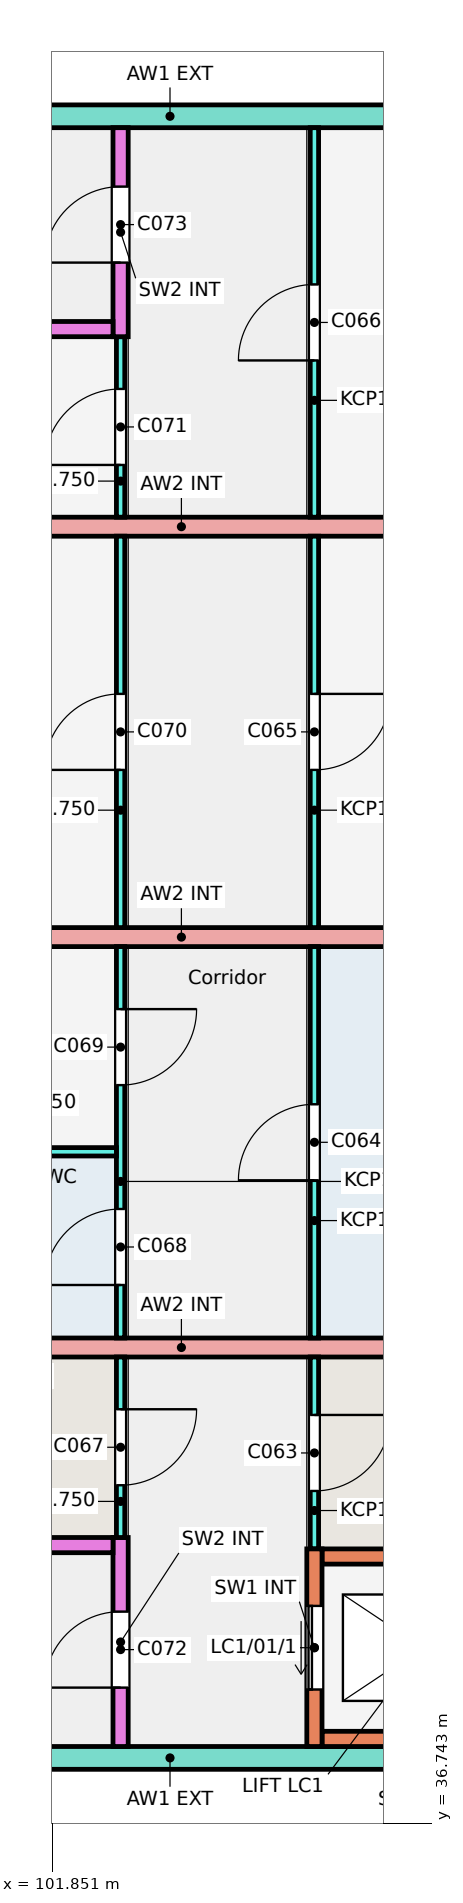
"""IFC4 building model, lengths in metres.
Left out: names, types, materials, properties, quantities, classifications, styles, units other than length and angle.
Written with IfcOpenShell. Run it as: python <this file> out.ifc"""

import sys

from ifc_helpers import new_model, si_unit, direction, frame, frame_2d, origin, place, context, subcontext, project, spatial, rectangle, extrude, element, fill, save


model = new_model("IFC4")
c1 = context("Model", 3, precision=1e-05, world=origin(), true_north=direction((0.0, 1.0)))
c2 = subcontext(c1, "Body", "Model", "MODEL_VIEW")
j1 = project(units=[si_unit("LENGTHUNIT", "METRE"), si_unit("PLANEANGLEUNIT", "RADIAN")], contexts=[c1])
p1 = place(None, origin())
s1 = spatial("IfcSite", under=j1, at=p1, CompositionType="ELEMENT")
p2 = place(p1, origin())
s2 = spatial("IfcBuilding", under=s1, at=p2, CompositionType="ELEMENT")
p3 = place(p2, frame((0.0, 0.0, 3.0)))
s3 = spatial("IfcBuildingStorey", under=s2, at=p3, CompositionType="ELEMENT", Elevation=3.0)
p4 = place(p3, frame((114.4, 37.6, 0.0), z_axis=(0.0, 0.0, 1.0), x_axis=(-1.0, 0.0, 0.0)))
e1 = element("IfcWall", 1, at=p4, inside=s3, PredefinedType="SOLIDWALL", context=c2, shape_type="SweptSolid", body=[
    extrude(rectangle(XDim=22.0, YDim=0.3, at=frame_2d((11.0, 0.0))), origin(), (0.0, 0.0, 1.0), 3.0),
])
p5 = place(p4, frame((14.298, 0.0, 0.9)))
e2 = element("IfcOpeningElement", 2, at=p5, cuts=e1, PredefinedType="OPENING", context=c2, shape_type="SweptSolid", body=[
    extrude(rectangle(XDim=1.2, YDim=1.5, at=frame_2d((0.6, 0.75))), frame((0.0, 0.16, 0.0), z_axis=(0.0, -1.0, 0.0), x_axis=(1.0, 0.0, 0.0)), (0.0, 0.0, 1.0), 0.32),
])
p6 = place(p3, frame((114.4, 59.2, 0.0), z_axis=(0.0, 0.0, 1.0), x_axis=(-1.0, 0.0, 0.0)))
e3 = element("IfcWall", 3, at=p6, inside=s3, PredefinedType="SOLIDWALL", context=c2, shape_type="SweptSolid", body=[
    extrude(rectangle(XDim=22.0, YDim=0.3, at=frame_2d((11.0, 0.0))), origin(), (0.0, 0.0, 1.0), 3.0),
])
p7 = place(p6, frame((14.298, 0.0, 0.9)))
e4 = element("IfcOpeningElement", 4, at=p7, cuts=e3, PredefinedType="OPENING", context=c2, shape_type="SweptSolid", body=[
    extrude(rectangle(XDim=1.2, YDim=1.5, at=frame_2d((0.6, 0.75))), frame((0.0, 0.16, 0.0), z_axis=(0.0, -1.0, 0.0), x_axis=(1.0, 0.0, 0.0)), (0.0, 0.0, 1.0), 0.32),
])
for number, where, z_axis, x_axis in (
    (5, (114.4, 43.0, 0.0), (0.0, 0.0, 1.0), (-1.0, 0.0, 0.0)),
    (6, (114.4, 48.4, 0.0), (0.0, 0.0, 1.0), (-1.0, 0.0, 0.0)),
    (7, (114.4, 53.8, 0.0), (0.0, 0.0, 1.0), (-1.0, 0.0, 0.0)),
):
    element("IfcWall", number, at=place(p3, frame(where, z_axis=z_axis, x_axis=x_axis)), inside=s3, PredefinedType="SOLIDWALL", context=c2, shape_type="SweptSolid", body=[
        extrude(rectangle(XDim=21.7, YDim=0.25, at=frame_2d((10.85, 0.0))), origin(), (0.0, 0.0, 1.0), 3.0),
    ])
p8 = place(p3, frame((105.3, 40.35, 0.0), z_axis=(0.0, 0.0, 1.0), x_axis=(0.0, 1.0, 0.0)))
e8 = element("IfcWall", 8, at=p8, inside=s3, PredefinedType="PARTITIONING", context=c2, shape_type="SweptSolid", body=[
    extrude(rectangle(XDim=2.525, YDim=0.11, at=frame_2d((1.262, 0.0))), origin(), (0.0, 0.0, 1.0), 2.75),
])
p9 = place(p8, frame((0.762, 0.0, 0.0)))
e9 = element("IfcOpeningElement", 9, at=p9, cuts=e8, PredefinedType="OPENING", context=c2, shape_type="SweptSolid", body=[
    extrude(rectangle(XDim=1.0, YDim=2.1, at=frame_2d((0.5, 1.05))), frame((0.0, 0.065, 0.0), z_axis=(0.0, -1.0, 0.0), x_axis=(1.0, 0.0, 0.0)), (0.0, 0.0, 1.0), 0.13),
])
p10 = place(p3, frame((105.3, 43.125, 0.0), z_axis=(0.0, 0.0, 1.0), x_axis=(0.0, 1.0, 0.0)))
e10 = element("IfcWall", 10, at=p10, inside=s3, PredefinedType="PARTITIONING", context=c2, shape_type="SweptSolid", body=[
    extrude(rectangle(XDim=5.15, YDim=0.11, at=frame_2d((2.575, 0.0))), origin(), (0.0, 0.0, 1.0), 2.75),
])
p11 = place(p10, frame((2.075, 0.0, 0.0)))
e11 = element("IfcOpeningElement", 11, at=p11, cuts=e10, PredefinedType="OPENING", context=c2, shape_type="SweptSolid", body=[
    extrude(rectangle(XDim=1.0, YDim=2.1, at=frame_2d((0.5, 1.05))), frame((0.0, 0.065, 0.0), z_axis=(0.0, -1.0, 0.0), x_axis=(1.0, 0.0, 0.0)), (0.0, 0.0, 1.0), 0.13),
])
p12 = place(p3, frame((105.3, 48.525, 0.0), z_axis=(0.0, 0.0, 1.0), x_axis=(0.0, 1.0, 0.0)))
e12 = element("IfcWall", 12, at=p12, inside=s3, PredefinedType="PARTITIONING", context=c2, shape_type="SweptSolid", body=[
    extrude(rectangle(XDim=5.15, YDim=0.11, at=frame_2d((2.575, 0.0))), origin(), (0.0, 0.0, 1.0), 2.75),
])
p13 = place(p12, frame((2.075, 0.0, 0.0)))
e13 = element("IfcOpeningElement", 13, at=p13, cuts=e12, PredefinedType="OPENING", context=c2, shape_type="SweptSolid", body=[
    extrude(rectangle(XDim=1.0, YDim=2.1, at=frame_2d((0.5, 1.05))), frame((0.0, 0.065, 0.0), z_axis=(0.0, -1.0, 0.0), x_axis=(1.0, 0.0, 0.0)), (0.0, 0.0, 1.0), 0.13),
])
p14 = place(p3, frame((105.3, 53.925, 0.0), z_axis=(0.0, 0.0, 1.0), x_axis=(0.0, 1.0, 0.0)))
e14 = element("IfcWall", 14, at=p14, inside=s3, PredefinedType="PARTITIONING", context=c2, shape_type="SweptSolid", body=[
    extrude(rectangle(XDim=5.125, YDim=0.11, at=frame_2d((2.562, 0.0))), origin(), (0.0, 0.0, 1.0), 2.75),
])
p15 = place(p14, frame((2.062, 0.0, 0.0)))
e15 = element("IfcOpeningElement", 15, at=p15, cuts=e14, PredefinedType="OPENING", context=c2, shape_type="SweptSolid", body=[
    extrude(rectangle(XDim=1.0, YDim=2.1, at=frame_2d((0.5, 1.05))), frame((0.0, 0.065, 0.0), z_axis=(0.0, -1.0, 0.0), x_axis=(1.0, 0.0, 0.0)), (0.0, 0.0, 1.0), 0.13),
])
p16 = place(p3, frame((102.75, 37.75, 0.0), z_axis=(0.0, 0.0, 1.0), x_axis=(0.0, 1.0, 0.0)))
e16 = element("IfcWall", 16, at=p16, inside=s3, PredefinedType="SOLIDWALL", context=c2, shape_type="SweptSolid", body=[
    extrude(rectangle(XDim=2.75, YDim=0.2, at=frame_2d((1.375, 0.0))), origin(), (0.0, 0.0, 1.0), 2.75),
])
p17 = place(p16, frame((0.775, 0.0, 0.0)))
e17 = element("IfcOpeningElement", 17, at=p17, cuts=e16, PredefinedType="OPENING", context=c2, shape_type="SweptSolid", body=[
    extrude(rectangle(XDim=1.0, YDim=2.1, at=frame_2d((0.5, 1.05))), frame((0.0, 0.11, 0.0), z_axis=(0.0, -1.0, 0.0), x_axis=(1.0, 0.0, 0.0)), (0.0, 0.0, 1.0), 0.22),
])
p18 = place(p3, frame((102.75, 40.5, 0.0), z_axis=(0.0, 0.0, 1.0), x_axis=(0.0, 1.0, 0.0)))
e18 = element("IfcWall", 18, at=p18, inside=s3, PredefinedType="PARTITIONING", context=c2, shape_type="SweptSolid", body=[
    extrude(rectangle(XDim=2.375, YDim=0.11, at=frame_2d((1.188, 0.0))), origin(), (0.0, 0.0, 1.0), 2.75),
])
p19 = place(p18, frame((0.688, 0.0, 0.0)))
e19 = element("IfcOpeningElement", 19, at=p19, cuts=e18, PredefinedType="OPENING", context=c2, shape_type="SweptSolid", body=[
    extrude(rectangle(XDim=1.0, YDim=2.1, at=frame_2d((0.5, 1.05))), frame((0.0, 0.065, 0.0), z_axis=(0.0, -1.0, 0.0), x_axis=(1.0, 0.0, 0.0)), (0.0, 0.0, 1.0), 0.13),
])
p20 = place(p3, frame((102.75, 43.125, 0.0), z_axis=(0.0, 0.0, 1.0), x_axis=(0.0, 1.0, 0.0)))
e20 = element("IfcWall", 20, at=p20, inside=s3, PredefinedType="PARTITIONING", context=c2, shape_type="SweptSolid", body=[
    extrude(rectangle(XDim=5.15, YDim=0.11, at=frame_2d((2.575, 0.0))), origin(), (0.0, 0.0, 1.0), 2.75),
])
p21 = place(p20, frame((0.698, 0.0, 0.0)))
e21 = element("IfcOpeningElement", 21, at=p21, cuts=e20, PredefinedType="OPENING", context=c2, shape_type="SweptSolid", body=[
    extrude(rectangle(XDim=1.0, YDim=2.1, at=frame_2d((0.5, 1.05))), frame((0.0, 0.065, 0.0), z_axis=(0.0, -1.0, 0.0), x_axis=(1.0, 0.0, 0.0)), (0.0, 0.0, 1.0), 0.13),
])
p22 = place(p20, frame((3.327, 0.0, 0.0)))
e22 = element("IfcOpeningElement", 22, at=p22, cuts=e20, PredefinedType="OPENING", context=c2, shape_type="SweptSolid", body=[
    extrude(rectangle(XDim=1.0, YDim=2.1, at=frame_2d((0.5, 1.05))), frame((0.0, 0.065, 0.0), z_axis=(0.0, -1.0, 0.0), x_axis=(1.0, 0.0, 0.0)), (0.0, 0.0, 1.0), 0.13),
])
p23 = place(p3, frame((102.75, 48.525, 0.0), z_axis=(0.0, 0.0, 1.0), x_axis=(0.0, 1.0, 0.0)))
e23 = element("IfcWall", 23, at=p23, inside=s3, PredefinedType="PARTITIONING", context=c2, shape_type="SweptSolid", body=[
    extrude(rectangle(XDim=5.15, YDim=0.11, at=frame_2d((2.575, 0.0))), origin(), (0.0, 0.0, 1.0), 2.75),
])
p24 = place(p23, frame((2.075, 0.0, 0.0)))
e24 = element("IfcOpeningElement", 24, at=p24, cuts=e23, PredefinedType="OPENING", context=c2, shape_type="SweptSolid", body=[
    extrude(rectangle(XDim=1.0, YDim=2.1, at=frame_2d((0.5, 1.05))), frame((0.0, 0.065, 0.0), z_axis=(0.0, -1.0, 0.0), x_axis=(1.0, 0.0, 0.0)), (0.0, 0.0, 1.0), 0.13),
])
p25 = place(p3, frame((102.75, 53.925, 0.0), z_axis=(0.0, 0.0, 1.0), x_axis=(0.0, 1.0, 0.0)))
e25 = element("IfcWall", 25, at=p25, inside=s3, PredefinedType="PARTITIONING", context=c2, shape_type="SweptSolid", body=[
    extrude(rectangle(XDim=2.375, YDim=0.11, at=frame_2d((1.188, 0.0))), origin(), (0.0, 0.0, 1.0), 2.75),
])
p26 = place(p25, frame((0.688, 0.0, 0.0)))
e26 = element("IfcOpeningElement", 26, at=p26, cuts=e25, PredefinedType="OPENING", context=c2, shape_type="SweptSolid", body=[
    extrude(rectangle(XDim=1.0, YDim=2.1, at=frame_2d((0.5, 1.05))), frame((0.0, 0.065, 0.0), z_axis=(0.0, -1.0, 0.0), x_axis=(1.0, 0.0, 0.0)), (0.0, 0.0, 1.0), 0.13),
])
p27 = place(p3, frame((102.75, 56.3, 0.0), z_axis=(0.0, 0.0, 1.0), x_axis=(0.0, 1.0, 0.0)))
e27 = element("IfcWall", 27, at=p27, inside=s3, PredefinedType="SOLIDWALL", context=c2, shape_type="SweptSolid", body=[
    extrude(rectangle(XDim=2.75, YDim=0.2, at=frame_2d((1.375, 0.0))), origin(), (0.0, 0.0, 1.0), 2.75),
])
p28 = place(p27, frame((0.975, 0.0, 0.0)))
e28 = element("IfcOpeningElement", 28, at=p28, cuts=e27, PredefinedType="OPENING", context=c2, shape_type="SweptSolid", body=[
    extrude(rectangle(XDim=1.0, YDim=2.1, at=frame_2d((0.5, 1.05))), frame((0.0, 0.11, 0.0), z_axis=(0.0, -1.0, 0.0), x_axis=(1.0, 0.0, 0.0)), (0.0, 0.0, 1.0), 0.22),
])
for number, where, z_axis, x_axis in (
    (29, (102.65, 40.4, 0.0), (0.0, 0.0, 1.0), (-1.0, 0.0, 0.0)),
    (30, (102.65, 56.4, 0.0), (0.0, 0.0, 1.0), (-1.0, 0.0, 0.0)),
):
    element("IfcWall", number, at=place(p3, frame(where, z_axis=z_axis, x_axis=x_axis)), inside=s3, PredefinedType="SOLIDWALL", context=c2, shape_type="SweptSolid", body=[
        extrude(rectangle(XDim=4.84, YDim=0.2, at=frame_2d((2.42, 0.0))), origin(), (0.0, 0.0, 1.0), 2.75),
    ])
p29 = place(p3, frame((102.695, 45.575, 0.0), z_axis=(0.0, 0.0, 1.0), x_axis=(-1.0, 0.0, 0.0)))
e31 = element("IfcWall", 31, at=p29, inside=s3, PredefinedType="PARTITIONING", context=c2, shape_type="SweptSolid", body=[
    extrude(rectangle(XDim=2.85, YDim=0.11, at=frame_2d((1.425, 0.0))), origin(), (0.0, 0.0, 1.0), 2.75),
])
for number, where, z_axis, x_axis in (
    (32, (107.95, 40.25, 0.0), (0.0, 0.0, 1.0), (-1.0, 0.0, 0.0)),
    (33, (107.95, 37.85, 0.0), (0.0, 0.0, 1.0), (-1.0, 0.0, 0.0)),
):
    element("IfcWall", number, at=place(p3, frame(where, z_axis=z_axis, x_axis=x_axis)), inside=s3, PredefinedType="SOLIDWALL", context=c2, shape_type="SweptSolid", body=[
        extrude(rectangle(XDim=2.55, YDim=0.2, at=frame_2d((1.275, 0.0))), origin(), (0.0, 0.0, 1.0), 3.0),
    ])
p30 = place(p3, frame((105.3, 37.75, 0.0), z_axis=(0.0, 0.0, 1.0), x_axis=(0.0, 1.0, 0.0)))
e34 = element("IfcWall", 34, at=p30, inside=s3, PredefinedType="SOLIDWALL", context=c2, shape_type="SweptSolid", body=[
    extrude(rectangle(XDim=2.6, YDim=0.2, at=frame_2d((1.3, 0.0))), origin(), (0.0, 0.0, 1.0), 3.0),
])
p31 = place(p30, frame((0.75, 0.0, 0.0)))
e35 = element("IfcOpeningElement", 35, at=p31, cuts=e34, PredefinedType="OPENING", context=c2, shape_type="SweptSolid", body=[
    extrude(rectangle(XDim=1.1, YDim=2.1, at=frame_2d((0.55, 1.05))), frame((0.0, 0.11, 0.0), z_axis=(0.0, -1.0, 0.0), x_axis=(1.0, 0.0, 0.0)), (0.0, 0.0, 1.0), 0.22),
])
p32 = place(p9, origin())
e36 = element("IfcDoor", 36, at=p32, inside=s3, OperationType="SINGLE_SWING_RIGHT", PredefinedType="DOOR", context=c2, shape_type="SweptSolid", body=[
    extrude(rectangle(XDim=1.0, YDim=2.1, at=frame_2d((0.5, 1.05))), frame((0.0, 0.025, 0.0), z_axis=(0.0, -1.0, 0.0), x_axis=(1.0, 0.0, 0.0)), (0.0, 0.0, 1.0), 0.05),
])
fill(e9, e36)
p33 = place(p11, origin())
e37 = element("IfcDoor", 37, at=p33, inside=s3, OperationType="SINGLE_SWING_LEFT", PredefinedType="DOOR", context=c2, shape_type="SweptSolid", body=[
    extrude(rectangle(XDim=1.0, YDim=2.1, at=frame_2d((0.5, 1.05))), frame((0.0, 0.025, 0.0), z_axis=(0.0, -1.0, 0.0), x_axis=(1.0, 0.0, 0.0)), (0.0, 0.0, 1.0), 0.05),
])
fill(e11, e37)
p34 = place(p13, origin())
e38 = element("IfcDoor", 38, at=p34, inside=s3, OperationType="SINGLE_SWING_RIGHT", PredefinedType="DOOR", context=c2, shape_type="SweptSolid", body=[
    extrude(rectangle(XDim=1.0, YDim=2.1, at=frame_2d((0.5, 1.05))), frame((0.0, 0.025, 0.0), z_axis=(0.0, -1.0, 0.0), x_axis=(1.0, 0.0, 0.0)), (0.0, 0.0, 1.0), 0.05),
])
fill(e13, e38)
p35 = place(p15, origin())
e39 = element("IfcDoor", 39, at=p35, inside=s3, OperationType="SINGLE_SWING_LEFT", PredefinedType="DOOR", context=c2, shape_type="SweptSolid", body=[
    extrude(rectangle(XDim=1.0, YDim=2.1, at=frame_2d((0.5, 1.05))), frame((0.0, 0.025, 0.0), z_axis=(0.0, -1.0, 0.0), x_axis=(1.0, 0.0, 0.0)), (0.0, 0.0, 1.0), 0.05),
])
fill(e15, e39)
p36 = place(p19, origin())
e40 = element("IfcDoor", 40, at=p36, inside=s3, OperationType="SINGLE_SWING_RIGHT", PredefinedType="DOOR", context=c2, shape_type="SweptSolid", body=[
    extrude(rectangle(XDim=1.0, YDim=2.1, at=frame_2d((0.5, 1.05))), frame((0.0, 0.025, 0.0), z_axis=(0.0, -1.0, 0.0), x_axis=(1.0, 0.0, 0.0)), (0.0, 0.0, 1.0), 0.05),
])
fill(e19, e40)
p37 = place(p21, origin())
e41 = element("IfcDoor", 41, at=p37, inside=s3, OperationType="SINGLE_SWING_LEFT", PredefinedType="DOOR", context=c2, shape_type="SweptSolid", body=[
    extrude(rectangle(XDim=1.0, YDim=2.1, at=frame_2d((0.5, 1.05))), frame((0.0, 0.025, 0.0), z_axis=(0.0, -1.0, 0.0), x_axis=(1.0, 0.0, 0.0)), (0.0, 0.0, 1.0), 0.05),
])
fill(e21, e41)
p38 = place(p22, origin())
e42 = element("IfcDoor", 42, at=p38, inside=s3, OperationType="SINGLE_SWING_RIGHT", PredefinedType="DOOR", context=c2, shape_type="SweptSolid", body=[
    extrude(rectangle(XDim=1.0, YDim=2.1, at=frame_2d((0.5, 1.05))), frame((0.0, 0.025, 0.0), z_axis=(0.0, -1.0, 0.0), x_axis=(1.0, 0.0, 0.0)), (0.0, 0.0, 1.0), 0.05),
])
fill(e22, e42)
p39 = place(p24, origin())
e43 = element("IfcDoor", 43, at=p39, inside=s3, OperationType="SINGLE_SWING_LEFT", PredefinedType="DOOR", context=c2, shape_type="SweptSolid", body=[
    extrude(rectangle(XDim=1.0, YDim=2.1, at=frame_2d((0.5, 1.05))), frame((0.0, 0.025, 0.0), z_axis=(0.0, -1.0, 0.0), x_axis=(1.0, 0.0, 0.0)), (0.0, 0.0, 1.0), 0.05),
])
fill(e24, e43)
p40 = place(p26, origin())
e44 = element("IfcDoor", 44, at=p40, inside=s3, OperationType="SINGLE_SWING_LEFT", PredefinedType="DOOR", context=c2, shape_type="SweptSolid", body=[
    extrude(rectangle(XDim=1.0, YDim=2.1, at=frame_2d((0.5, 1.05))), frame((0.0, 0.025, 0.0), z_axis=(0.0, -1.0, 0.0), x_axis=(1.0, 0.0, 0.0)), (0.0, 0.0, 1.0), 0.05),
])
fill(e26, e44)
p41 = place(p17, origin())
e45 = element("IfcDoor", 45, at=p41, inside=s3, OperationType="SINGLE_SWING_LEFT", PredefinedType="DOOR", context=c2, shape_type="SweptSolid", body=[
    extrude(rectangle(XDim=1.0, YDim=2.1, at=frame_2d((0.5, 1.05))), frame((0.0, 0.025, 0.0), z_axis=(0.0, -1.0, 0.0), x_axis=(1.0, 0.0, 0.0)), (0.0, 0.0, 1.0), 0.05),
])
fill(e17, e45)
p42 = place(p28, origin())
e46 = element("IfcDoor", 46, at=p42, inside=s3, OperationType="SINGLE_SWING_LEFT", PredefinedType="DOOR", context=c2, shape_type="SweptSolid", body=[
    extrude(rectangle(XDim=1.0, YDim=2.1, at=frame_2d((0.5, 1.05))), frame((0.0, 0.025, 0.0), z_axis=(0.0, -1.0, 0.0), x_axis=(1.0, 0.0, 0.0)), (0.0, 0.0, 1.0), 0.05),
])
fill(e28, e46)
p43 = place(p31, origin())
e47 = element("IfcDoor", 47, at=p43, inside=s3, OperationType="SLIDING_TO_LEFT", PredefinedType="DOOR", context=c2, shape_type="SweptSolid", body=[
    extrude(rectangle(XDim=1.1, YDim=2.1, at=frame_2d((0.55, 1.05))), frame((0.0, 0.025, 0.0), z_axis=(0.0, -1.0, 0.0), x_axis=(1.0, 0.0, 0.0)), (0.0, 0.0, 1.0), 0.05),
])
fill(e35, e47)
save(model, sys.argv[1])
